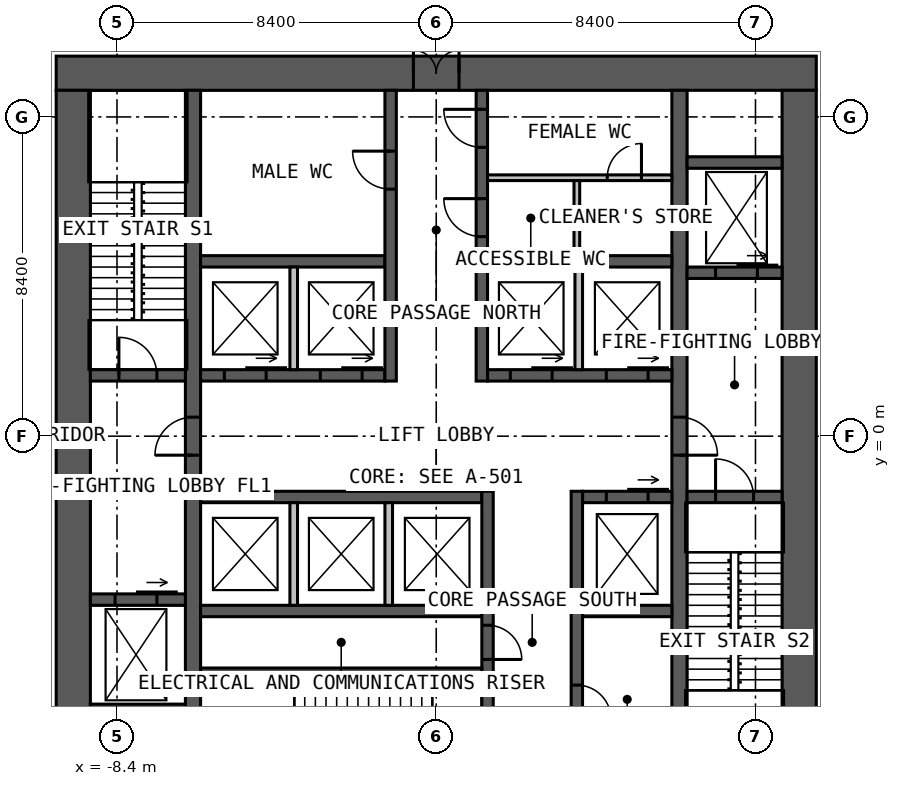
"""IFC4 building model, lengths in metres.
Left out: names, types, materials, properties, quantities, classifications, styles, units other than length and angle.
Written with IfcOpenShell. Run it as: python <this file> out.ifc"""

import sys

from ifc_helpers import new_model, si_unit, direction, frame, frame_2d, origin, place, context, subcontext, project, spatial, rectangle, extrude, element, fill, save


model = new_model("IFC4")
c1 = context("Model", 3, precision=1e-05, world=origin(), true_north=direction((0.0, 1.0)))
c2 = subcontext(c1, "Body", "Model", "MODEL_VIEW")
j1 = project(units=[si_unit("LENGTHUNIT", "METRE"), si_unit("PLANEANGLEUNIT", "RADIAN")], contexts=[c1])
p1 = place(None, origin())
s1 = spatial("IfcSite", under=j1, at=p1, CompositionType="ELEMENT")
p2 = place(p1, origin())
s2 = spatial("IfcBuilding", under=s1, at=p2, CompositionType="ELEMENT")
p3 = place(p2, frame((0.0, 0.0, 11.0)))
s3 = spatial("IfcBuildingStorey", under=s2, at=p3, CompositionType="ELEMENT", Elevation=11.0)
p4 = place(p3, frame((-10.0, 9.55, 0.0), z_axis=(0.0, 0.0, 1.0), x_axis=(1.0, 0.0, 0.0)))
e1 = element("IfcWall", 1, at=p4, inside=s3, PredefinedType="SOLIDWALL", context=c2, shape_type="SweptSolid", body=[
    extrude(rectangle(XDim=20.0, YDim=0.9, at=frame_2d((10.0, 0.0))), origin(), (0.0, 0.0, 1.0), 5.0),
])
p5 = place(p4, frame((9.4, 0.0, 0.0)))
e2 = element("IfcOpeningElement", 2, at=p5, cuts=e1, PredefinedType="OPENING", context=c2, shape_type="SweptSolid", body=[
    extrude(rectangle(XDim=1.2, YDim=2.2, at=frame_2d((0.6, 1.1))), frame((0.0, 0.46, 0.0), z_axis=(0.0, -1.0, 0.0), x_axis=(1.0, 0.0, 0.0)), (0.0, 0.0, 1.0), 0.92),
])
for number, where, z_axis, x_axis in (
    (3, (9.55, -9.1, 0.0), (0.0, 0.0, 1.0), (0.0, 1.0, 0.0)),
    (4, (-9.55, 9.1, 0.0), (0.0, 0.0, 1.0), (0.0, -1.0, 0.0)),
):
    element("IfcWall", number, at=place(p3, frame(where, z_axis=z_axis, x_axis=x_axis)), inside=s3, PredefinedType="SOLIDWALL", context=c2, shape_type="SweptSolid", body=[
        extrude(rectangle(XDim=18.2, YDim=0.9, at=frame_2d((9.1, 0.0))), origin(), (0.0, 0.0, 1.0), 5.0),
    ])
p6 = place(p3, frame((-6.4, -9.1, 0.0), z_axis=(0.0, 0.0, 1.0), x_axis=(0.0, 1.0, 0.0)))
e5 = element("IfcWall", 5, at=p6, inside=s3, PredefinedType="SOLIDWALL", context=c2, shape_type="SweptSolid", body=[
    extrude(rectangle(XDim=18.2, YDim=0.4, at=frame_2d((9.1, 0.0))), origin(), (0.0, 0.0, 1.0), 5.0),
])
p7 = place(p6, frame((8.6, 0.0, 0.0)))
e6 = element("IfcOpeningElement", 6, at=p7, cuts=e5, PredefinedType="OPENING", context=c2, shape_type="SweptSolid", body=[
    extrude(rectangle(XDim=1.0, YDim=2.2, at=frame_2d((0.5, 1.1))), frame((0.0, 0.21, 0.0), z_axis=(0.0, -1.0, 0.0), x_axis=(1.0, 0.0, 0.0)), (0.0, 0.0, 1.0), 0.42),
])
p8 = place(p3, frame((6.4, 9.1, 0.0), z_axis=(0.0, 0.0, 1.0), x_axis=(0.0, -1.0, 0.0)))
e7 = element("IfcWall", 7, at=p8, inside=s3, PredefinedType="SOLIDWALL", context=c2, shape_type="SweptSolid", body=[
    extrude(rectangle(XDim=18.2, YDim=0.4, at=frame_2d((9.1, 0.0))), origin(), (0.0, 0.0, 1.0), 5.0),
])
p9 = place(p8, frame((8.6, 0.0, 0.0)))
e8 = element("IfcOpeningElement", 8, at=p9, cuts=e7, PredefinedType="OPENING", context=c2, shape_type="SweptSolid", body=[
    extrude(rectangle(XDim=1.0, YDim=2.2, at=frame_2d((0.5, 1.1))), frame((0.0, 0.21, 0.0), z_axis=(0.0, -1.0, 0.0), x_axis=(1.0, 0.0, 0.0)), (0.0, 0.0, 1.0), 0.42),
])
p10 = place(p3, frame((-6.2, 1.6, 0.0), z_axis=(0.0, 0.0, 1.0), x_axis=(1.0, 0.0, 0.0)))
e9 = element("IfcWall", 9, at=p10, inside=s3, PredefinedType="SOLIDWALL", context=c2, shape_type="SweptSolid", body=[
    extrude(rectangle(XDim=4.85, YDim=0.3, at=frame_2d((2.425, 0.0))), origin(), (0.0, 0.0, 1.0), 5.0),
])
p11 = place(p10, frame((0.625, 0.0, 0.0)))
e10 = element("IfcOpeningElement", 10, at=p11, cuts=e9, PredefinedType="OPENING", context=c2, shape_type="SweptSolid", body=[
    extrude(rectangle(XDim=1.1, YDim=2.2, at=frame_2d((0.55, 1.1))), frame((0.0, 0.16, 0.0), z_axis=(0.0, -1.0, 0.0), x_axis=(1.0, 0.0, 0.0)), (0.0, 0.0, 1.0), 0.32),
])
p12 = place(p10, frame((3.15, 0.0, 0.0)))
e11 = element("IfcOpeningElement", 11, at=p12, cuts=e9, PredefinedType="OPENING", context=c2, shape_type="SweptSolid", body=[
    extrude(rectangle(XDim=1.1, YDim=2.2, at=frame_2d((0.55, 1.1))), frame((0.0, 0.16, 0.0), z_axis=(0.0, -1.0, 0.0), x_axis=(1.0, 0.0, 0.0)), (0.0, 0.0, 1.0), 0.32),
])
p13 = place(p3, frame((1.35, 1.6, 0.0), z_axis=(0.0, 0.0, 1.0), x_axis=(1.0, 0.0, 0.0)))
e12 = element("IfcWall", 12, at=p13, inside=s3, PredefinedType="SOLIDWALL", context=c2, shape_type="SweptSolid", body=[
    extrude(rectangle(XDim=4.85, YDim=0.3, at=frame_2d((2.425, 0.0))), origin(), (0.0, 0.0, 1.0), 5.0),
])
p14 = place(p13, frame((0.6, 0.0, 0.0)))
e13 = element("IfcOpeningElement", 13, at=p14, cuts=e12, PredefinedType="OPENING", context=c2, shape_type="SweptSolid", body=[
    extrude(rectangle(XDim=1.1, YDim=2.2, at=frame_2d((0.55, 1.1))), frame((0.0, 0.16, 0.0), z_axis=(0.0, -1.0, 0.0), x_axis=(1.0, 0.0, 0.0)), (0.0, 0.0, 1.0), 0.32),
])
p15 = place(p13, frame((3.125, 0.0, 0.0)))
e14 = element("IfcOpeningElement", 14, at=p15, cuts=e12, PredefinedType="OPENING", context=c2, shape_type="SweptSolid", body=[
    extrude(rectangle(XDim=1.1, YDim=2.2, at=frame_2d((0.55, 1.1))), frame((0.0, 0.16, 0.0), z_axis=(0.0, -1.0, 0.0), x_axis=(1.0, 0.0, 0.0)), (0.0, 0.0, 1.0), 0.32),
])
for number, where, z_axis, x_axis in (
    (15, (-6.2, 4.6, 0.0), (0.0, 0.0, 1.0), (1.0, 0.0, 0.0)),
    (16, (1.35, 4.6, 0.0), (0.0, 0.0, 1.0), (1.0, 0.0, 0.0)),
):
    element("IfcWall", number, at=place(p3, frame(where, z_axis=z_axis, x_axis=x_axis)), inside=s3, PredefinedType="SOLIDWALL", context=c2, shape_type="SweptSolid", body=[
        extrude(rectangle(XDim=4.85, YDim=0.3, at=frame_2d((2.425, 0.0))), origin(), (0.0, 0.0, 1.0), 5.0),
    ])
p16 = place(p3, frame((-1.2, 1.45, 0.0), z_axis=(0.0, 0.0, 1.0), x_axis=(0.0, 1.0, 0.0)))
e17 = element("IfcWall", 17, at=p16, inside=s3, PredefinedType="SOLIDWALL", context=c2, shape_type="SweptSolid", body=[
    extrude(rectangle(XDim=7.65, YDim=0.3, at=frame_2d((3.825, 0.0))), origin(), (0.0, 0.0, 1.0), 5.0),
])
p17 = place(p16, frame((5.05, 0.0, 0.0)))
e18 = element("IfcOpeningElement", 18, at=p17, cuts=e17, PredefinedType="OPENING", context=c2, shape_type="SweptSolid", body=[
    extrude(rectangle(XDim=1.0, YDim=2.2, at=frame_2d((0.5, 1.1))), frame((0.0, 0.16, 0.0), z_axis=(0.0, -1.0, 0.0), x_axis=(1.0, 0.0, 0.0)), (0.0, 0.0, 1.0), 0.32),
])
p18 = place(p3, frame((1.2, 1.45, 0.0), z_axis=(0.0, 0.0, 1.0), x_axis=(0.0, 1.0, 0.0)))
e19 = element("IfcWall", 19, at=p18, inside=s3, PredefinedType="SOLIDWALL", context=c2, shape_type="SweptSolid", body=[
    extrude(rectangle(XDim=7.65, YDim=0.3, at=frame_2d((3.825, 0.0))), origin(), (0.0, 0.0, 1.0), 5.0),
])
p19 = place(p18, frame((3.8, 0.0, 0.0)))
e20 = element("IfcOpeningElement", 20, at=p19, cuts=e19, PredefinedType="OPENING", context=c2, shape_type="SweptSolid", body=[
    extrude(rectangle(XDim=1.0, YDim=2.2, at=frame_2d((0.5, 1.1))), frame((0.0, 0.16, 0.0), z_axis=(0.0, -1.0, 0.0), x_axis=(1.0, 0.0, 0.0)), (0.0, 0.0, 1.0), 0.32),
])
p20 = place(p18, frame((6.15, 0.0, 0.0)))
e21 = element("IfcOpeningElement", 21, at=p20, cuts=e19, PredefinedType="OPENING", context=c2, shape_type="SweptSolid", body=[
    extrude(rectangle(XDim=1.0, YDim=2.2, at=frame_2d((0.5, 1.1))), frame((0.0, 0.16, 0.0), z_axis=(0.0, -1.0, 0.0), x_axis=(1.0, 0.0, 0.0)), (0.0, 0.0, 1.0), 0.32),
])
p21 = place(p3, frame((-6.2, -1.6, 0.0), z_axis=(0.0, 0.0, 1.0), x_axis=(1.0, 0.0, 0.0)))
e22 = element("IfcWall", 22, at=p21, inside=s3, PredefinedType="SOLIDWALL", context=c2, shape_type="SweptSolid", body=[
    extrude(rectangle(XDim=7.4, YDim=0.3, at=frame_2d((3.7, 0.0))), origin(), (0.0, 0.0, 1.0), 5.0),
])
p22 = place(p3, frame((3.85, -1.6, 0.0), z_axis=(0.0, 0.0, 1.0), x_axis=(1.0, 0.0, 0.0)))
e23 = element("IfcWall", 23, at=p22, inside=s3, PredefinedType="SOLIDWALL", context=c2, shape_type="SweptSolid", body=[
    extrude(rectangle(XDim=2.35, YDim=0.3, at=frame_2d((1.175, 0.0))), origin(), (0.0, 0.0, 1.0), 5.0),
])
p23 = place(p22, frame((0.625, 0.0, 0.0)))
e24 = element("IfcOpeningElement", 24, at=p23, cuts=e23, PredefinedType="OPENING", context=c2, shape_type="SweptSolid", body=[
    extrude(rectangle(XDim=1.1, YDim=2.2, at=frame_2d((0.55, 1.1))), frame((0.0, 0.16, 0.0), z_axis=(0.0, -1.0, 0.0), x_axis=(1.0, 0.0, 0.0)), (0.0, 0.0, 1.0), 0.32),
])
p24 = place(p3, frame((-6.2, -4.6, 0.0), z_axis=(0.0, 0.0, 1.0), x_axis=(1.0, 0.0, 0.0)))
e25 = element("IfcWall", 25, at=p24, inside=s3, PredefinedType="SOLIDWALL", context=c2, shape_type="SweptSolid", body=[
    extrude(rectangle(XDim=7.4, YDim=0.3, at=frame_2d((3.7, 0.0))), origin(), (0.0, 0.0, 1.0), 5.0),
])
p25 = place(p3, frame((3.85, -4.6, 0.0), z_axis=(0.0, 0.0, 1.0), x_axis=(1.0, 0.0, 0.0)))
e26 = element("IfcWall", 26, at=p25, inside=s3, PredefinedType="SOLIDWALL", context=c2, shape_type="SweptSolid", body=[
    extrude(rectangle(XDim=2.35, YDim=0.3, at=frame_2d((1.175, 0.0))), origin(), (0.0, 0.0, 1.0), 5.0),
])
p26 = place(p3, frame((1.35, -1.45, 0.0), z_axis=(0.0, 0.0, 1.0), x_axis=(0.0, -1.0, 0.0)))
e27 = element("IfcWall", 27, at=p26, inside=s3, PredefinedType="SOLIDWALL", context=c2, shape_type="SweptSolid", body=[
    extrude(rectangle(XDim=7.65, YDim=0.3, at=frame_2d((3.825, 0.0))), origin(), (0.0, 0.0, 1.0), 5.0),
])
p27 = place(p26, frame((5.75, 0.0, 0.0)))
e28 = element("IfcOpeningElement", 28, at=p27, cuts=e27, PredefinedType="OPENING", context=c2, shape_type="SweptSolid", body=[
    extrude(rectangle(XDim=1.0, YDim=2.2, at=frame_2d((0.5, 1.1))), frame((0.0, 0.16, 0.0), z_axis=(0.0, -1.0, 0.0), x_axis=(1.0, 0.0, 0.0)), (0.0, 0.0, 1.0), 0.32),
])
p28 = place(p26, frame((3.525, 0.0, 0.0)))
e29 = element("IfcOpeningElement", 29, at=p28, cuts=e27, PredefinedType="OPENING", context=c2, shape_type="SweptSolid", body=[
    extrude(rectangle(XDim=0.9, YDim=2.2, at=frame_2d((0.45, 1.1))), frame((0.0, 0.16, 0.0), z_axis=(0.0, -1.0, 0.0), x_axis=(1.0, 0.0, 0.0)), (0.0, 0.0, 1.0), 0.32),
])
p29 = place(p3, frame((3.7, -1.45, 0.0), z_axis=(0.0, 0.0, 1.0), x_axis=(0.0, -1.0, 0.0)))
e30 = element("IfcWall", 30, at=p29, inside=s3, PredefinedType="SOLIDWALL", context=c2, shape_type="SweptSolid", body=[
    extrude(rectangle(XDim=7.65, YDim=0.3, at=frame_2d((3.825, 0.0))), origin(), (0.0, 0.0, 1.0), 5.0),
])
p30 = place(p29, frame((5.1, 0.0, 0.0)))
e31 = element("IfcOpeningElement", 31, at=p30, cuts=e30, PredefinedType="OPENING", context=c2, shape_type="SweptSolid", body=[
    extrude(rectangle(XDim=0.9, YDim=2.2, at=frame_2d((0.45, 1.1))), frame((0.0, 0.16, 0.0), z_axis=(0.0, -1.0, 0.0), x_axis=(1.0, 0.0, 0.0)), (0.0, 0.0, 1.0), 0.32),
])
p31 = place(p3, frame((-6.2, -6.2, 0.0), z_axis=(0.0, 0.0, 1.0), x_axis=(1.0, 0.0, 0.0)))
e32 = element("IfcWall", 32, at=p31, inside=s3, PredefinedType="SOLIDWALL", context=c2, shape_type="SweptSolid", body=[
    extrude(rectangle(XDim=7.4, YDim=0.2, at=frame_2d((3.7, 0.0))), origin(), (0.0, 0.0, 1.0), 5.0),
])
p32 = place(p3, frame((-9.1, 1.6, 0.0), z_axis=(0.0, 0.0, 1.0), x_axis=(1.0, 0.0, 0.0)))
e33 = element("IfcWall", 33, at=p32, inside=s3, PredefinedType="SOLIDWALL", context=c2, shape_type="SweptSolid", body=[
    extrude(rectangle(XDim=2.5, YDim=0.3, at=frame_2d((1.25, 0.0))), origin(), (0.0, 0.0, 1.0), 5.0),
])
p33 = place(p32, frame((0.75, 0.0, 0.0)))
e34 = element("IfcOpeningElement", 34, at=p33, cuts=e33, PredefinedType="OPENING", context=c2, shape_type="SweptSolid", body=[
    extrude(rectangle(XDim=1.0, YDim=2.2, at=frame_2d((0.5, 1.1))), frame((0.0, 0.16, 0.0), z_axis=(0.0, -1.0, 0.0), x_axis=(1.0, 0.0, 0.0)), (0.0, 0.0, 1.0), 0.32),
])
p34 = place(p3, frame((6.6, -1.6, 0.0), z_axis=(0.0, 0.0, 1.0), x_axis=(1.0, 0.0, 0.0)))
e35 = element("IfcWall", 35, at=p34, inside=s3, PredefinedType="SOLIDWALL", context=c2, shape_type="SweptSolid", body=[
    extrude(rectangle(XDim=2.5, YDim=0.3, at=frame_2d((1.25, 0.0))), origin(), (0.0, 0.0, 1.0), 5.0),
])
p35 = place(p34, frame((0.75, 0.0, 0.0)))
e36 = element("IfcOpeningElement", 36, at=p35, cuts=e35, PredefinedType="OPENING", context=c2, shape_type="SweptSolid", body=[
    extrude(rectangle(XDim=1.0, YDim=2.2, at=frame_2d((0.5, 1.1))), frame((0.0, 0.16, 0.0), z_axis=(0.0, -1.0, 0.0), x_axis=(1.0, 0.0, 0.0)), (0.0, 0.0, 1.0), 0.32),
])
p36 = place(p3, frame((-9.1, -4.3, 0.0), z_axis=(0.0, 0.0, 1.0), x_axis=(1.0, 0.0, 0.0)))
e37 = element("IfcWall", 37, at=p36, inside=s3, PredefinedType="SOLIDWALL", context=c2, shape_type="SweptSolid", body=[
    extrude(rectangle(XDim=2.5, YDim=0.3, at=frame_2d((1.25, 0.0))), origin(), (0.0, 0.0, 1.0), 5.0),
])
p37 = place(p36, frame((0.65, 0.0, 0.0)))
e38 = element("IfcOpeningElement", 38, at=p37, cuts=e37, PredefinedType="OPENING", context=c2, shape_type="SweptSolid", body=[
    extrude(rectangle(XDim=1.1, YDim=2.2, at=frame_2d((0.55, 1.1))), frame((0.0, 0.16, 0.0), z_axis=(0.0, -1.0, 0.0), x_axis=(1.0, 0.0, 0.0)), (0.0, 0.0, 1.0), 0.32),
])
p38 = place(p3, frame((6.6, 4.3, 0.0), z_axis=(0.0, 0.0, 1.0), x_axis=(1.0, 0.0, 0.0)))
e39 = element("IfcWall", 39, at=p38, inside=s3, PredefinedType="SOLIDWALL", context=c2, shape_type="SweptSolid", body=[
    extrude(rectangle(XDim=2.5, YDim=0.3, at=frame_2d((1.25, 0.0))), origin(), (0.0, 0.0, 1.0), 5.0),
])
p39 = place(p38, frame((0.75, 0.0, 0.0)))
e40 = element("IfcOpeningElement", 40, at=p39, cuts=e39, PredefinedType="OPENING", context=c2, shape_type="SweptSolid", body=[
    extrude(rectangle(XDim=1.1, YDim=2.2, at=frame_2d((0.55, 1.1))), frame((0.0, 0.16, 0.0), z_axis=(0.0, -1.0, 0.0), x_axis=(1.0, 0.0, 0.0)), (0.0, 0.0, 1.0), 0.32),
])
for number, where, z_axis, x_axis in (
    (41, (-9.1, -7.2, 0.0), (0.0, 0.0, 1.0), (1.0, 0.0, 0.0)),
    (42, (6.6, 7.2, 0.0), (0.0, 0.0, 1.0), (1.0, 0.0, 0.0)),
):
    element("IfcWall", number, at=place(p3, frame(where, z_axis=z_axis, x_axis=x_axis)), inside=s3, PredefinedType="SOLIDWALL", context=c2, shape_type="SweptSolid", body=[
        extrude(rectangle(XDim=2.5, YDim=0.3, at=frame_2d((1.25, 0.0))), origin(), (0.0, 0.0, 1.0), 5.0),
    ])
for number, where, z_axis, x_axis in (
    (43, (-3.75, 1.75, 0.0), (0.0, 0.0, 1.0), (0.0, 1.0, 0.0)),
    (44, (3.75, 1.75, 0.0), (0.0, 0.0, 1.0), (0.0, 1.0, 0.0)),
    (45, (-3.75, -1.75, 0.0), (0.0, 0.0, 1.0), (0.0, -1.0, 0.0)),
    (46, (-1.25, -1.75, 0.0), (0.0, 0.0, 1.0), (0.0, -1.0, 0.0)),
):
    element("IfcWall", number, at=place(p3, frame(where, z_axis=z_axis, x_axis=x_axis)), inside=s3, PredefinedType="SOLIDWALL", context=c2, shape_type="SweptSolid", body=[
        extrude(rectangle(XDim=2.7, YDim=0.2, at=frame_2d((1.35, 0.0))), origin(), (0.0, 0.0, 1.0), 4.75),
    ])
p40 = place(p3, frame((1.35, 6.8, 0.0), z_axis=(0.0, 0.0, 1.0), x_axis=(1.0, 0.0, 0.0)))
e47 = element("IfcWall", 47, at=p40, inside=s3, PredefinedType="PARTITIONING", context=c2, shape_type="SweptSolid", body=[
    extrude(rectangle(XDim=4.85, YDim=0.15, at=frame_2d((2.425, 0.0))), origin(), (0.0, 0.0, 1.0), 4.75),
])
p41 = place(p40, frame((3.15, 0.0, 0.0)))
e48 = element("IfcOpeningElement", 48, at=p41, cuts=e47, PredefinedType="OPENING", context=c2, shape_type="SweptSolid", body=[
    extrude(rectangle(XDim=0.9, YDim=2.2, at=frame_2d((0.45, 1.1))), frame((0.0, 0.085, 0.0), z_axis=(0.0, -1.0, 0.0), x_axis=(1.0, 0.0, 0.0)), (0.0, 0.0, 1.0), 0.17),
])
p42 = place(p3, frame((3.7, 4.75, 0.0), z_axis=(0.0, 0.0, 1.0), x_axis=(0.0, 1.0, 0.0)))
e49 = element("IfcWall", 49, at=p42, inside=s3, PredefinedType="PARTITIONING", context=c2, shape_type="SweptSolid", body=[
    extrude(rectangle(XDim=1.975, YDim=0.15, at=frame_2d((0.988, 0.0))), origin(), (0.0, 0.0, 1.0), 4.75),
])
p43 = place(p5, origin())
e50 = element("IfcDoor", 50, at=p43, inside=s3, OperationType="DOUBLE_DOOR_SINGLE_SWING", PredefinedType="DOOR", context=c2, shape_type="SweptSolid", body=[
    extrude(rectangle(XDim=1.2, YDim=2.2, at=frame_2d((0.6, 1.1))), frame((0.0, 0.025, 0.0), z_axis=(0.0, -1.0, 0.0), x_axis=(1.0, 0.0, 0.0)), (0.0, 0.0, 1.0), 0.05),
])
fill(e2, e50)
p44 = place(p7, origin())
e51 = element("IfcDoor", 51, at=p44, inside=s3, OperationType="SINGLE_SWING_LEFT", PredefinedType="DOOR", context=c2, shape_type="SweptSolid", body=[
    extrude(rectangle(XDim=1.0, YDim=2.2, at=frame_2d((0.5, 1.1))), frame((0.0, 0.025, 0.0), z_axis=(0.0, -1.0, 0.0), x_axis=(1.0, 0.0, 0.0)), (0.0, 0.0, 1.0), 0.05),
])
fill(e6, e51)
p45 = place(p9, origin())
e52 = element("IfcDoor", 52, at=p45, inside=s3, OperationType="SINGLE_SWING_RIGHT", PredefinedType="DOOR", context=c2, shape_type="SweptSolid", body=[
    extrude(rectangle(XDim=1.0, YDim=2.2, at=frame_2d((0.5, 1.1))), frame((0.0, 0.025, 0.0), z_axis=(0.0, -1.0, 0.0), x_axis=(1.0, 0.0, 0.0)), (0.0, 0.0, 1.0), 0.05),
])
fill(e8, e52)
p46 = place(p33, origin())
e53 = element("IfcDoor", 53, at=p46, inside=s3, OperationType="SINGLE_SWING_LEFT", PredefinedType="DOOR", context=c2, shape_type="SweptSolid", body=[
    extrude(rectangle(XDim=1.0, YDim=2.2, at=frame_2d((0.5, 1.1))), frame((0.0, 0.025, 0.0), z_axis=(0.0, -1.0, 0.0), x_axis=(1.0, 0.0, 0.0)), (0.0, 0.0, 1.0), 0.05),
])
fill(e34, e53)
p47 = place(p35, origin())
e54 = element("IfcDoor", 54, at=p47, inside=s3, OperationType="SINGLE_SWING_LEFT", PredefinedType="DOOR", context=c2, shape_type="SweptSolid", body=[
    extrude(rectangle(XDim=1.0, YDim=2.2, at=frame_2d((0.5, 1.1))), frame((0.0, 0.025, 0.0), z_axis=(0.0, -1.0, 0.0), x_axis=(1.0, 0.0, 0.0)), (0.0, 0.0, 1.0), 0.05),
])
fill(e36, e54)
p48 = place(p17, origin())
e55 = element("IfcDoor", 55, at=p48, inside=s3, OperationType="SINGLE_SWING_RIGHT", PredefinedType="DOOR", context=c2, shape_type="SweptSolid", body=[
    extrude(rectangle(XDim=1.0, YDim=2.2, at=frame_2d((0.5, 1.1))), frame((0.0, 0.025, 0.0), z_axis=(0.0, -1.0, 0.0), x_axis=(1.0, 0.0, 0.0)), (0.0, 0.0, 1.0), 0.05),
])
fill(e18, e55)
p49 = place(p19, origin())
e56 = element("IfcDoor", 56, at=p49, inside=s3, OperationType="SINGLE_SWING_RIGHT", PredefinedType="DOOR", context=c2, shape_type="SweptSolid", body=[
    extrude(rectangle(XDim=1.0, YDim=2.2, at=frame_2d((0.5, 1.1))), frame((0.0, 0.025, 0.0), z_axis=(0.0, -1.0, 0.0), x_axis=(1.0, 0.0, 0.0)), (0.0, 0.0, 1.0), 0.05),
])
fill(e20, e56)
p50 = place(p20, origin())
e57 = element("IfcDoor", 57, at=p50, inside=s3, OperationType="SINGLE_SWING_RIGHT", PredefinedType="DOOR", context=c2, shape_type="SweptSolid", body=[
    extrude(rectangle(XDim=1.0, YDim=2.2, at=frame_2d((0.5, 1.1))), frame((0.0, 0.025, 0.0), z_axis=(0.0, -1.0, 0.0), x_axis=(1.0, 0.0, 0.0)), (0.0, 0.0, 1.0), 0.05),
])
fill(e21, e57)
p51 = place(p28, origin())
e58 = element("IfcDoor", 58, at=p51, inside=s3, OperationType="SINGLE_SWING_RIGHT", PredefinedType="DOOR", context=c2, shape_type="SweptSolid", body=[
    extrude(rectangle(XDim=0.9, YDim=2.2, at=frame_2d((0.45, 1.1))), frame((0.0, 0.025, 0.0), z_axis=(0.0, -1.0, 0.0), x_axis=(1.0, 0.0, 0.0)), (0.0, 0.0, 1.0), 0.05),
])
fill(e29, e58)
p52 = place(p30, origin())
e59 = element("IfcDoor", 59, at=p52, inside=s3, OperationType="SINGLE_SWING_RIGHT", PredefinedType="DOOR", context=c2, shape_type="SweptSolid", body=[
    extrude(rectangle(XDim=0.9, YDim=2.2, at=frame_2d((0.45, 1.1))), frame((0.0, 0.025, 0.0), z_axis=(0.0, -1.0, 0.0), x_axis=(1.0, 0.0, 0.0)), (0.0, 0.0, 1.0), 0.05),
])
fill(e31, e59)
p53 = place(p41, origin())
e60 = element("IfcDoor", 60, at=p53, inside=s3, OperationType="SINGLE_SWING_RIGHT", PredefinedType="DOOR", context=c2, shape_type="SweptSolid", body=[
    extrude(rectangle(XDim=0.9, YDim=2.2, at=frame_2d((0.45, 1.1))), frame((0.0, 0.025, 0.0), z_axis=(0.0, -1.0, 0.0), x_axis=(1.0, 0.0, 0.0)), (0.0, 0.0, 1.0), 0.05),
])
fill(e48, e60)
p54 = place(p11, origin())
e61 = element("IfcDoor", 61, at=p54, inside=s3, OperationType="SLIDING_TO_LEFT", PredefinedType="DOOR", context=c2, shape_type="SweptSolid", body=[
    extrude(rectangle(XDim=1.1, YDim=2.2, at=frame_2d((0.55, 1.1))), frame((0.0, 0.025, 0.0), z_axis=(0.0, -1.0, 0.0), x_axis=(1.0, 0.0, 0.0)), (0.0, 0.0, 1.0), 0.05),
])
fill(e10, e61)
p55 = place(p12, origin())
e62 = element("IfcDoor", 62, at=p55, inside=s3, OperationType="SLIDING_TO_LEFT", PredefinedType="DOOR", context=c2, shape_type="SweptSolid", body=[
    extrude(rectangle(XDim=1.1, YDim=2.2, at=frame_2d((0.55, 1.1))), frame((0.0, 0.025, 0.0), z_axis=(0.0, -1.0, 0.0), x_axis=(1.0, 0.0, 0.0)), (0.0, 0.0, 1.0), 0.05),
])
fill(e11, e62)
p56 = place(p14, origin())
e63 = element("IfcDoor", 63, at=p56, inside=s3, OperationType="SLIDING_TO_LEFT", PredefinedType="DOOR", context=c2, shape_type="SweptSolid", body=[
    extrude(rectangle(XDim=1.1, YDim=2.2, at=frame_2d((0.55, 1.1))), frame((0.0, 0.025, 0.0), z_axis=(0.0, -1.0, 0.0), x_axis=(1.0, 0.0, 0.0)), (0.0, 0.0, 1.0), 0.05),
])
fill(e13, e63)
p57 = place(p15, origin())
e64 = element("IfcDoor", 64, at=p57, inside=s3, OperationType="SLIDING_TO_LEFT", PredefinedType="DOOR", context=c2, shape_type="SweptSolid", body=[
    extrude(rectangle(XDim=1.1, YDim=2.2, at=frame_2d((0.55, 1.1))), frame((0.0, 0.025, 0.0), z_axis=(0.0, -1.0, 0.0), x_axis=(1.0, 0.0, 0.0)), (0.0, 0.0, 1.0), 0.05),
])
fill(e14, e64)
p58 = place(p23, origin())
e65 = element("IfcDoor", 65, at=p58, inside=s3, OperationType="SLIDING_TO_LEFT", PredefinedType="DOOR", context=c2, shape_type="SweptSolid", body=[
    extrude(rectangle(XDim=1.1, YDim=2.2, at=frame_2d((0.55, 1.1))), frame((0.0, 0.025, 0.0), z_axis=(0.0, -1.0, 0.0), x_axis=(1.0, 0.0, 0.0)), (0.0, 0.0, 1.0), 0.05),
])
fill(e24, e65)
p59 = place(p37, origin())
e66 = element("IfcDoor", 66, at=p59, inside=s3, OperationType="SLIDING_TO_LEFT", PredefinedType="DOOR", context=c2, shape_type="SweptSolid", body=[
    extrude(rectangle(XDim=1.1, YDim=2.2, at=frame_2d((0.55, 1.1))), frame((0.0, 0.025, 0.0), z_axis=(0.0, -1.0, 0.0), x_axis=(1.0, 0.0, 0.0)), (0.0, 0.0, 1.0), 0.05),
])
fill(e38, e66)
p60 = place(p39, origin())
e67 = element("IfcDoor", 67, at=p60, inside=s3, OperationType="SLIDING_TO_LEFT", PredefinedType="DOOR", context=c2, shape_type="SweptSolid", body=[
    extrude(rectangle(XDim=1.1, YDim=2.2, at=frame_2d((0.55, 1.1))), frame((0.0, 0.025, 0.0), z_axis=(0.0, -1.0, 0.0), x_axis=(1.0, 0.0, 0.0)), (0.0, 0.0, 1.0), 0.05),
])
fill(e40, e67)
save(model, sys.argv[1])
